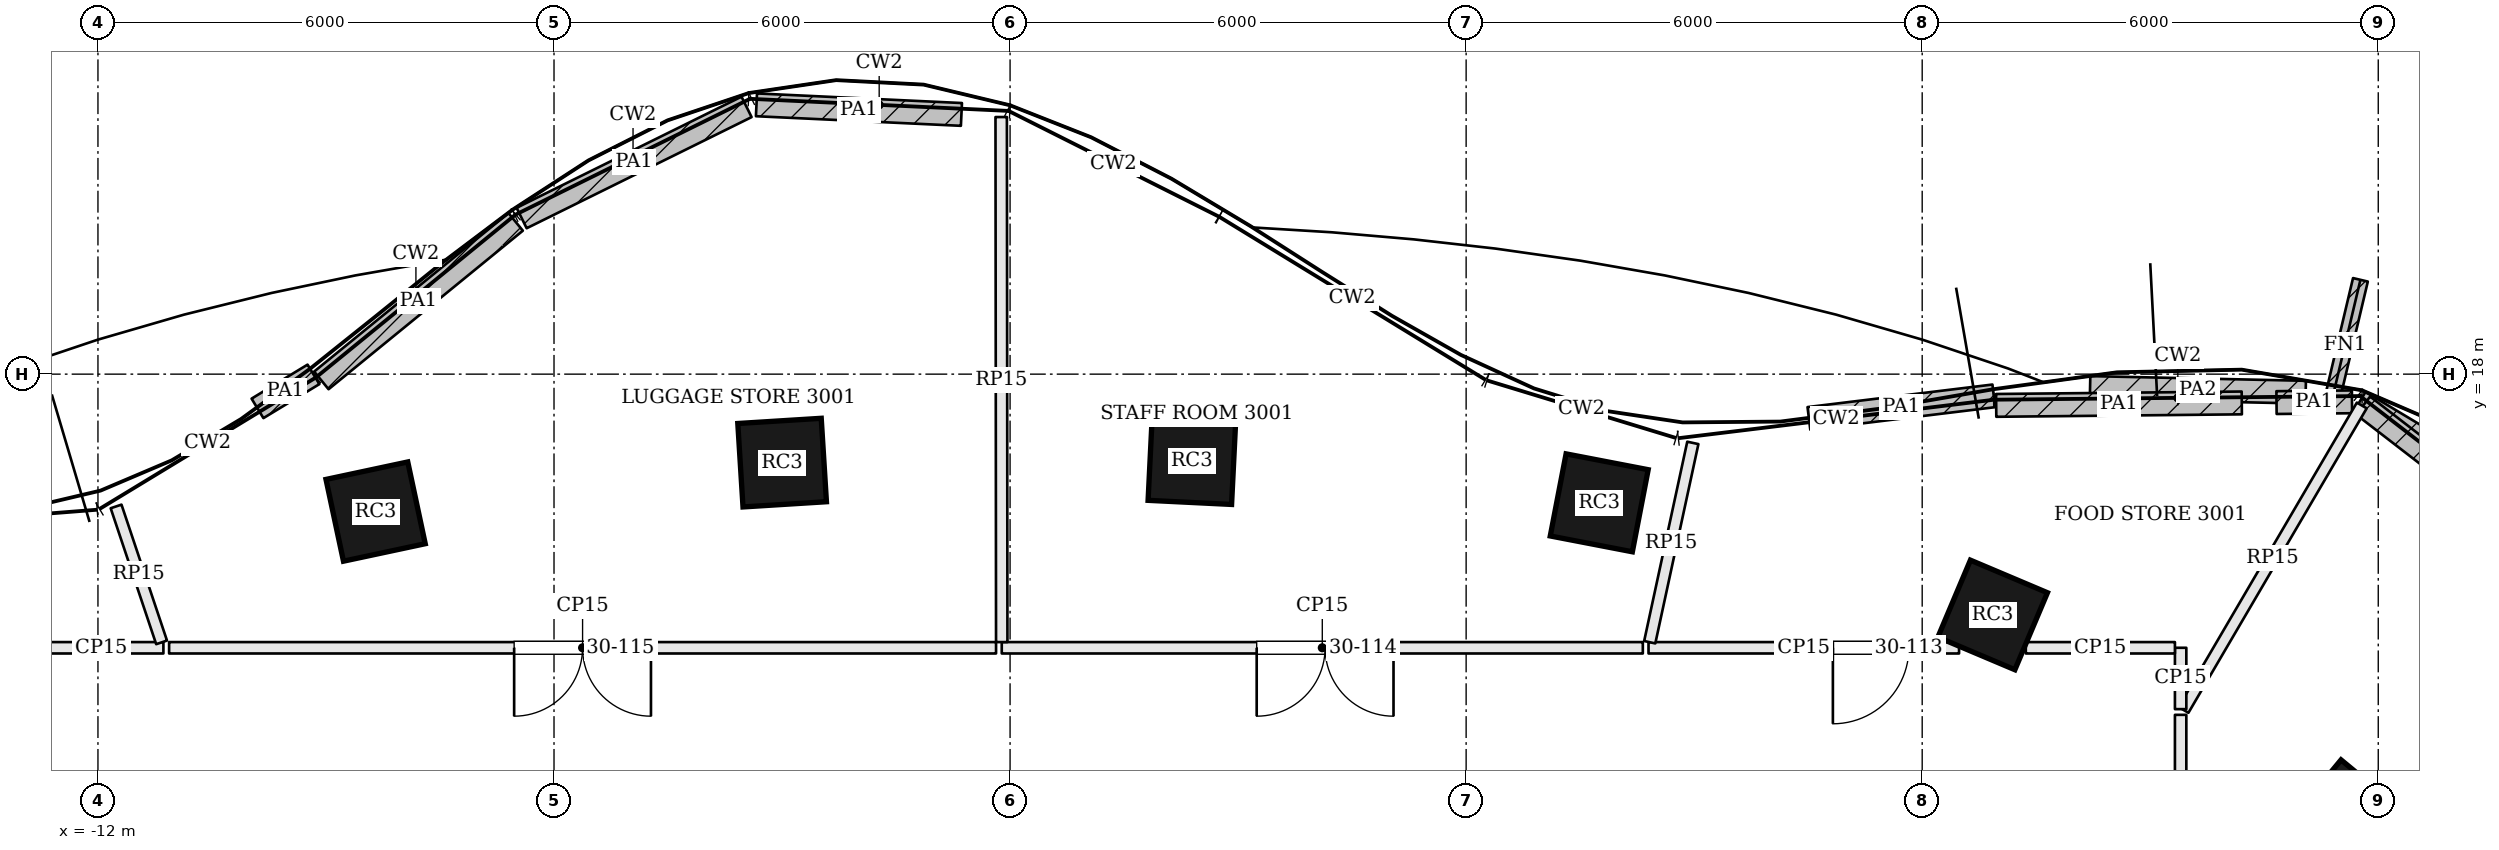
"""IFC4 building model, lengths in metres.
Left out: names, types, materials, properties, quantities, classifications, styles, units other than length and angle.
Written with IfcOpenShell. Run it as: python <this file> out.ifc"""

import sys

from ifc_helpers import new_model, si_unit, direction, frame, frame_2d, origin, origin_2d, place, context, subcontext, project, spatial, rectangle, extrude, element, fill, save


model = new_model("IFC4")
c1 = context("Model", 3, precision=1e-05, world=origin(), true_north=direction((0.0, 1.0)))
c2 = subcontext(c1, "Body", "Model", "MODEL_VIEW")
j1 = project(units=[si_unit("LENGTHUNIT", "METRE"), si_unit("PLANEANGLEUNIT", "RADIAN")], contexts=[c1])
p1 = place(None, origin())
s1 = spatial("IfcSite", under=j1, at=p1, CompositionType="ELEMENT")
p2 = place(p1, origin())
s2 = spatial("IfcBuilding", under=s1, at=p2, CompositionType="ELEMENT")
p3 = place(p2, frame((0.0, 0.0, 125.7)))
s3 = spatial("IfcBuildingStorey", under=s2, at=p3, CompositionType="ELEMENT", Elevation=125.7)
for number, where, z_axis, x_axis in (
    (1, (17.584, 12.151, -0.7), (0.0, 0.0, 1.0), (-0.771, 0.637, 0.0)),
    (2, (12.927, 14.832, -0.7), (0.0, 0.0, 1.0), (-0.921, 0.389, 0.0)),
    (3, (7.751, 16.307, -0.7), (0.0, 0.0, 1.0), (-0.982, 0.189, 0.0)),
    (4, (2.392, 16.862, -0.7), (0.0, 0.0, 1.0), (-0.999, 0.049, 0.0)),
    (5, (-2.999, 16.836, -0.7), (0.0, 0.0, 1.0), (-0.998, -0.062, 0.0)),
    (6, (-8.347, 16.192, -0.7), (0.0, 0.0, 1.0), (-0.978, -0.209, 0.0)),
):
    element("IfcColumn", number, at=place(p3, frame(where, z_axis=z_axis, x_axis=x_axis)), inside=s3, PredefinedType="COLUMN", context=c2, shape_type="SweptSolid", body=[
        extrude(rectangle(XDim=1.1, YDim=1.1, at=origin_2d()), origin(), (0.0, 0.0, 1.0), 5.5),
    ])
p4 = place(p3, frame((17.362, 17.538, 0.0), z_axis=(0.0, 0.0, 1.0), x_axis=(0.230469860183, 0.973079464148, 0.0)))
e7 = element("IfcWall", 7, at=p4, inside=s3, PredefinedType="SOLIDWALL", context=c2, shape_type="SweptSolid", body=[
    extrude(rectangle(XDim=1.75, YDim=0.2, at=frame_2d((0.875, 0.0))), origin(), (0.0, 0.0, 1.0), 4.6),
])
p5 = place(p3, frame((14.208, 17.824, 0.0), z_axis=(0.0, 0.0, 1.0), x_axis=(0.999761139516, -0.021855523663, 0.0)))
e8 = element("IfcWall", 8, at=p5, inside=s3, PredefinedType="PARAPET", context=c2, shape_type="SweptSolid", body=[
    extrude(rectangle(XDim=2.837, YDim=0.3, at=frame_2d((1.419, 0.0))), origin(), (0.0, 0.0, 1.0), 1.1),
])
p6 = place(p3, frame((17.756, 17.637, 0.0), z_axis=(0.0, 0.0, 1.0), x_axis=(0.857429569369, -0.514601334599, 0.0)))
e9 = element("IfcWall", 9, at=p6, inside=s3, PredefinedType="PARAPET", context=c2, shape_type="SweptSolid", body=[
    extrude(rectangle(XDim=2.72, YDim=0.3, at=frame_2d((1.36, 0.0))), origin(), (0.0, 0.0, 1.0), 1.1),
])
p7 = place(p3, frame((20.396, 15.584, 4.8), z_axis=(0.0, 0.0, 1.0), x_axis=(-0.791653544836, 0.610970265191, 0.0)))
e10 = element("IfcWall", 10, at=p7, inside=s3, PredefinedType="PARAPET", context=c2, shape_type="SweptSolid", body=[
    extrude(rectangle(XDim=3.277, YDim=0.3, at=frame_2d((1.638, 0.0))), origin(), (0.0, 0.0, 1.0), 1.1),
])
p8 = place(p3, frame((17.655, 17.636, 4.8), z_axis=(0.0, 0.0, 1.0), x_axis=(-0.999949189172, -0.010080628659, 0.0)))
e11 = element("IfcWall", 11, at=p8, inside=s3, PredefinedType="PARAPET", context=c2, shape_type="SweptSolid", body=[
    extrude(rectangle(XDim=0.993, YDim=0.3, at=frame_2d((0.497, 0.0))), origin(), (0.0, 0.0, 1.0), 1.1),
])
p9 = place(p3, frame((16.205, 17.621, 4.8), z_axis=(0.0, 0.0, 1.0), x_axis=(-0.999950267811, -0.009973058961, 0.0)))
e12 = element("IfcWall", 12, at=p9, inside=s3, PredefinedType="PARAPET", context=c2, shape_type="SweptSolid", body=[
    extrude(rectangle(XDim=3.231, YDim=0.3, at=frame_2d((1.616, 0.0))), origin(), (0.0, 0.0, 1.0), 1.1),
])
p10 = place(p3, frame((12.942, 17.714, 4.8), z_axis=(0.0, 0.0, 1.0), x_axis=(-0.992648796767, -0.121030435331, 0.0)))
e13 = element("IfcWall", 13, at=p10, inside=s3, PredefinedType="PARAPET", context=c2, shape_type="SweptSolid", body=[
    extrude(rectangle(XDim=2.451, YDim=0.3, at=frame_2d((1.226, 0.0))), origin(), (0.0, 0.0, 1.0), 1.1),
])
p11 = place(p3, frame((-0.64, 21.417, 4.8), z_axis=(0.0, 0.0, 1.0), x_axis=(-0.998902248936, 0.046843324728, 0.0)))
e14 = element("IfcWall", 14, at=p11, inside=s3, PredefinedType="PARAPET", context=c2, shape_type="SweptSolid", body=[
    extrude(rectangle(XDim=2.7, YDim=0.3, at=frame_2d((1.35, 0.0))), origin(), (0.0, 0.0, 1.0), 1.1),
])
p12 = place(p3, frame((-3.467, 21.516, 4.8), z_axis=(0.0, 0.0, 1.0), x_axis=(-0.896532590338, -0.442977781003, 0.0)))
e15 = element("IfcWall", 15, at=p12, inside=s3, PredefinedType="PARAPET", context=c2, shape_type="SweptSolid", body=[
    extrude(rectangle(XDim=3.301, YDim=0.3, at=frame_2d((1.65, 0.0))), origin(), (0.0, 0.0, 1.0), 1.1),
])
p13 = place(p3, frame((-6.505, 20.003, 4.8), z_axis=(0.0, 0.0, 1.0), x_axis=(-0.774774389425, -0.632237807705, 0.0)))
e16 = element("IfcWall", 16, at=p13, inside=s3, PredefinedType="PARAPET", context=c2, shape_type="SweptSolid", body=[
    extrude(rectangle(XDim=3.299, YDim=0.3, at=frame_2d((1.649, 0.0))), origin(), (0.0, 0.0, 1.0), 1.1),
])
p14 = place(p3, frame((-9.164, 17.997, 4.8), z_axis=(0.0, 0.0, 1.0), x_axis=(-0.854630396294, -0.519236830098, 0.0)))
e17 = element("IfcWall", 17, at=p14, inside=s3, PredefinedType="PARAPET", context=c2, shape_type="SweptSolid", body=[
    extrude(rectangle(XDim=0.862, YDim=0.3, at=frame_2d((0.431, 0.0))), origin(), (0.0, 0.0, 1.0), 1.1),
])
p15 = place(p3, frame((-11.139, 14.4, 0.0), z_axis=(0.0, 0.0, 1.0), x_axis=(-1.0, 0.0, 0.0)))
e18 = element("IfcWall", 18, at=p15, inside=s3, PredefinedType="PARTITIONING", context=c2, shape_type="SweptSolid", body=[
    extrude(rectangle(XDim=1.632, YDim=0.15, at=frame_2d((0.816, 0.0))), origin(), (0.0, 0.0, 1.0), 4.098),
])
p16 = place(p3, frame((-11.761, 16.26, 0.0), z_axis=(0.0, 0.0, 1.0), x_axis=(0.317547878941, -0.948242239399, 0.0)))
e19 = element("IfcWall", 19, at=p16, inside=s3, PredefinedType="PARTITIONING", context=c2, shape_type="SweptSolid", body=[
    extrude(rectangle(XDim=1.886, YDim=0.15, at=frame_2d((0.943, 0.0))), origin(), (0.0, 0.0, 1.0), 4.098),
])
p17 = place(p3, frame((15.4, 4.221, 0.0), z_axis=(0.0, 0.0, 1.0), x_axis=(0.0, 1.0, 0.0)))
e20 = element("IfcWall", 20, at=p17, inside=s3, PredefinedType="PARTITIONING", context=c2, shape_type="SweptSolid", body=[
    extrude(rectangle(XDim=9.297, YDim=0.15, at=frame_2d((4.648, 0.0))), origin(), (0.0, 0.0, 1.0), 4.098),
])
p18 = place(p17, frame((3.711, 0.0, 0.0)))
e21 = element("IfcOpeningElement", 21, at=p18, cuts=e20, PredefinedType="OPENING", context=c2, shape_type="SweptSolid", body=[
    extrude(rectangle(XDim=1.8, YDim=2.1, at=frame_2d((0.9, 1.05))), frame((0.0, 0.085, 0.0), z_axis=(0.0, -1.0, 0.0), x_axis=(1.0, 0.0, 0.0)), (0.0, 0.0, 1.0), 0.17),
])
p19 = place(p3, frame((17.783, 17.588, 0.0), z_axis=(0.0, 0.0, 1.0), x_axis=(-0.505276661202, -0.862957412417, 0.0)))
e22 = element("IfcWall", 22, at=p19, inside=s3, PredefinedType="PARTITIONING", context=c2, shape_type="SweptSolid", body=[
    extrude(rectangle(XDim=4.641, YDim=0.15, at=frame_2d((2.321, 0.0))), origin(), (0.0, 0.0, 1.0), 4.098),
])
p20 = place(p3, frame((15.4, 13.593, 0.0), z_axis=(0.0, 0.0, 1.0), x_axis=(0.0, 1.0, 0.0)))
e23 = element("IfcWall", 23, at=p20, inside=s3, PredefinedType="PARTITIONING", context=c2, shape_type="SweptSolid", body=[
    extrude(rectangle(XDim=0.807, YDim=0.15, at=frame_2d((0.404, 0.0))), origin(), (0.0, 0.0, 1.0), 4.098),
])
p21 = place(p3, frame((15.325, 14.4, 0.0), z_axis=(0.0, 0.0, 1.0), x_axis=(-1.0, 0.0, 0.0)))
e24 = element("IfcWall", 24, at=p21, inside=s3, PredefinedType="PARTITIONING", context=c2, shape_type="SweptSolid", body=[
    extrude(rectangle(XDim=1.962, YDim=0.15, at=frame_2d((0.981, 0.0))), origin(), (0.0, 0.0, 1.0), 4.098),
])
p22 = place(p3, frame((12.485, 14.4, 0.0), z_axis=(0.0, 0.0, 1.0), x_axis=(-1.0, 0.0, 0.0)))
e25 = element("IfcWall", 25, at=p22, inside=s3, PredefinedType="PARTITIONING", context=c2, shape_type="SweptSolid", body=[
    extrude(rectangle(XDim=4.085, YDim=0.15, at=frame_2d((2.043, 0.0))), origin(), (0.0, 0.0, 1.0), 4.098),
])
p23 = place(p22, frame((0.66, 0.0, 0.0)))
e26 = element("IfcOpeningElement", 26, at=p23, cuts=e25, PredefinedType="OPENING", context=c2, shape_type="SweptSolid", body=[
    extrude(rectangle(XDim=1.0, YDim=2.1, at=frame_2d((0.5, 1.05))), frame((0.0, 0.085, 0.0), z_axis=(0.0, -1.0, 0.0), x_axis=(1.0, 0.0, 0.0)), (0.0, 0.0, 1.0), 0.17),
])
p24 = place(p3, frame((8.982, 17.095, 0.0), z_axis=(0.0, 0.0, 1.0), x_axis=(-0.211318693695, -0.97741721373, 0.0)))
e27 = element("IfcWall", 27, at=p24, inside=s3, PredefinedType="PARTITIONING", context=c2, shape_type="SweptSolid", body=[
    extrude(rectangle(XDim=2.683, YDim=0.15, at=frame_2d((1.341, 0.0))), origin(), (0.0, 0.0, 1.0), 4.098),
])
p25 = place(p3, frame((8.325, 14.4, 0.0), z_axis=(0.0, 0.0, 1.0), x_axis=(-1.0, 0.0, 0.0)))
e28 = element("IfcWall", 28, at=p25, inside=s3, PredefinedType="PARTITIONING", context=c2, shape_type="SweptSolid", body=[
    extrude(rectangle(XDim=8.434, YDim=0.15, at=frame_2d((4.217, 0.0))), origin(), (0.0, 0.0, 1.0), 4.098),
])
p26 = place(p25, frame((3.28, 0.0, 0.0)))
e29 = element("IfcOpeningElement", 29, at=p26, cuts=e28, PredefinedType="OPENING", context=c2, shape_type="SweptSolid", body=[
    extrude(rectangle(XDim=1.8, YDim=2.1, at=frame_2d((0.9, 1.05))), frame((0.0, 0.085, 0.0), z_axis=(0.0, -1.0, 0.0), x_axis=(1.0, 0.0, 0.0)), (0.0, 0.0, 1.0), 0.17),
])
p27 = place(p3, frame((-0.117, 21.382, 0.0), z_axis=(0.0, 0.0, 1.0), x_axis=(0.001060369827, -0.999999437808, 0.0)))
e30 = element("IfcWall", 30, at=p27, inside=s3, PredefinedType="PARTITIONING", context=c2, shape_type="SweptSolid", body=[
    extrude(rectangle(XDim=6.907, YDim=0.15, at=frame_2d((3.454, 0.0))), origin(), (0.0, 0.0, 1.0), 4.098),
])
p28 = place(p3, frame((-0.185, 14.4, 0.0), z_axis=(0.0, 0.0, 1.0), x_axis=(-1.0, 0.0, 0.0)))
e31 = element("IfcWall", 31, at=p28, inside=s3, PredefinedType="PARTITIONING", context=c2, shape_type="SweptSolid", body=[
    extrude(rectangle(XDim=10.879, YDim=0.15, at=frame_2d((5.44, 0.0))), origin(), (0.0, 0.0, 1.0), 4.098),
])
p29 = place(p28, frame((4.54, 0.0, 0.0)))
e32 = element("IfcOpeningElement", 32, at=p29, cuts=e31, PredefinedType="OPENING", context=c2, shape_type="SweptSolid", body=[
    extrude(rectangle(XDim=1.8, YDim=2.1, at=frame_2d((0.9, 1.05))), frame((0.0, 0.085, 0.0), z_axis=(0.0, -1.0, 0.0), x_axis=(1.0, 0.0, 0.0)), (0.0, 0.0, 1.0), 0.17),
])
p30 = place(p23, origin())
e33 = element("IfcDoor", 33, at=p30, inside=s3, OperationType="SINGLE_SWING_RIGHT", PredefinedType="DOOR", context=c2, shape_type="SweptSolid", body=[
    extrude(rectangle(XDim=1.0, YDim=2.1, at=frame_2d((0.5, 1.05))), frame((0.0, 0.025, 0.0), z_axis=(0.0, -1.0, 0.0), x_axis=(1.0, 0.0, 0.0)), (0.0, 0.0, 1.0), 0.05),
])
fill(e26, e33)
p31 = place(p26, origin())
e34 = element("IfcDoor", 34, at=p31, inside=s3, OperationType="DOUBLE_DOOR_SINGLE_SWING", PredefinedType="DOOR", context=c2, shape_type="SweptSolid", body=[
    extrude(rectangle(XDim=1.8, YDim=2.1, at=frame_2d((0.9, 1.05))), frame((0.0, 0.025, 0.0), z_axis=(0.0, -1.0, 0.0), x_axis=(1.0, 0.0, 0.0)), (0.0, 0.0, 1.0), 0.05),
])
fill(e29, e34)
p32 = place(p29, origin())
e35 = element("IfcDoor", 35, at=p32, inside=s3, OperationType="DOUBLE_DOOR_SINGLE_SWING", PredefinedType="DOOR", context=c2, shape_type="SweptSolid", body=[
    extrude(rectangle(XDim=1.8, YDim=2.1, at=frame_2d((0.9, 1.05))), frame((0.0, 0.025, 0.0), z_axis=(0.0, -1.0, 0.0), x_axis=(1.0, 0.0, 0.0)), (0.0, 0.0, 1.0), 0.05),
])
fill(e32, e35)
save(model, sys.argv[1])
